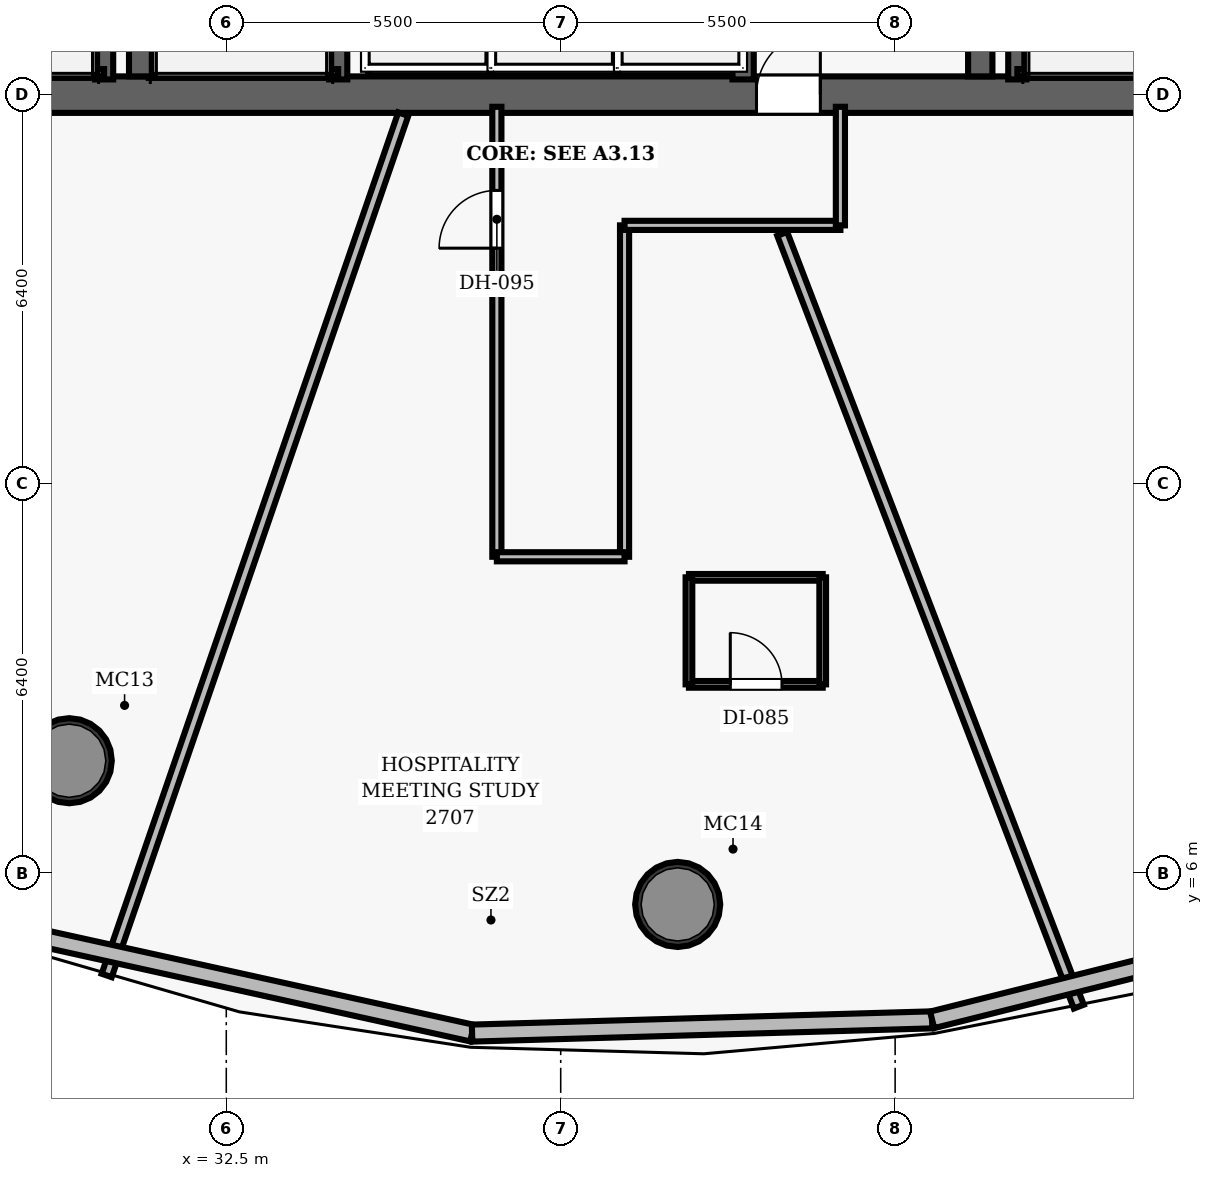
"""IFC4 building model, lengths in metres.
Left out: names, types, materials, properties, quantities, classifications, styles, units other than length and angle.
Written with IfcOpenShell. Run it as: python <this file> out.ifc"""

import sys

from ifc_helpers import new_model, si_unit, direction, frame, frame_2d, origin, origin_2d, place, context, subcontext, project, spatial, rectangle, hollow_circle, extrude, element, fill, save


model = new_model("IFC4")
c1 = context("Model", 3, precision=1e-05, world=origin(), true_north=direction((0.0, 1.0)))
c2 = subcontext(c1, "Body", "Model", "MODEL_VIEW")
j1 = project(units=[si_unit("LENGTHUNIT", "METRE"), si_unit("PLANEANGLEUNIT", "RADIAN")], contexts=[c1])
p1 = place(None, origin())
s1 = spatial("IfcSite", under=j1, at=p1, CompositionType="ELEMENT")
p2 = place(p1, origin())
s2 = spatial("IfcBuilding", under=s1, at=p2, CompositionType="ELEMENT")
p3 = place(p2, frame((0.0, 0.0, 113.3)))
s3 = spatial("IfcBuildingStorey", under=s2, at=p3, CompositionType="ELEMENT", Elevation=113.3)
p4 = place(p3, frame((26.7, 18.8, 0.0), z_axis=(0.0, 0.0, 1.0), x_axis=(1.0, 0.0, 0.0)))
e1 = element("IfcWall", 1, at=p4, inside=s3, PredefinedType="SHEAR", context=c2, shape_type="SweptSolid", body=[
    extrude(rectangle(XDim=22.6, YDim=0.6, at=frame_2d((11.3, 0.0))), origin(), (0.0, 0.0, 1.0), 3.5),
])
p5 = place(p4, frame((14.52, 0.0, 0.0)))
e2 = element("IfcOpeningElement", 2, at=p5, cuts=e1, PredefinedType="OPENING", context=c2, shape_type="SweptSolid", body=[
    extrude(rectangle(XDim=1.05, YDim=2.15, at=frame_2d((0.525, 1.075))), frame((0.0, 0.31, 0.0), z_axis=(0.0, -1.0, 0.0), x_axis=(1.0, 0.0, 0.0)), (0.0, 0.0, 1.0), 0.62),
])
for number, where, z_axis, x_axis in (
    (3, (31.1, 19.1, 0.0), (0.0, 0.0, 1.0), (0.0, 1.0, 0.0)),
    (4, (44.9, 19.1, 0.0), (0.0, 0.0, 1.0), (0.0, 1.0, 0.0)),
):
    element("IfcWall", number, at=place(p3, frame(where, z_axis=z_axis, x_axis=x_axis)), inside=s3, PredefinedType="SHEAR", context=c2, shape_type="SweptSolid", body=[
        extrude(rectangle(XDim=13.8, YDim=0.4, at=frame_2d((6.9, 0.0))), origin(), (0.0, 0.0, 1.0), 3.5),
    ])
for number, where, z_axis, x_axis in (
    (5, (29.917, 7.846, 0.0), (0.0, 0.0, 1.0), (1.0, 0.0, 0.0)),
    (6, (39.924, 5.483, 0.0), (0.0, 0.0, 1.0), (1.0, 0.0, 0.0)),
):
    element("IfcColumn", number, at=place(p3, frame(where, z_axis=z_axis, x_axis=x_axis)), inside=s3, PredefinedType="COLUMN", context=c2, shape_type="SweptSolid", body=[
        extrude(hollow_circle(Radius=0.7, WallThickness=0.055, at=origin_2d()), origin(), (0.0, 0.0, 1.0), 3.5),
    ])
p6 = place(p3, frame((30.49, 19.05, 0.0), z_axis=(0.0, 0.0, 1.0), x_axis=(0.0, 1.0, 0.0)))
e7 = element("IfcWall", 7, at=p6, inside=s3, PredefinedType="SHEAR", context=c2, shape_type="SweptSolid", body=[
    extrude(rectangle(XDim=7.5, YDim=0.3, at=frame_2d((3.75, 0.0))), origin(), (0.0, 0.0, 1.0), 3.5),
])
p7 = place(p3, frame((27.395, 19.16, 0.0), z_axis=(0.0, 0.0, 1.0), x_axis=(1.0, 0.0, 0.0)))
e8 = element("IfcWall", 8, at=p7, inside=s3, PredefinedType="SHEAR", context=c2, shape_type="SweptSolid", body=[
    extrude(rectangle(XDim=3.095, YDim=0.12, at=frame_2d((1.547, 0.0))), origin(), (0.0, 0.0, 1.0), 3.5),
])
p8 = place(p3, frame((45.51, 19.05, 0.0), z_axis=(0.0, 0.0, 1.0), x_axis=(0.0, 1.0, 0.0)))
e9 = element("IfcWall", 9, at=p8, inside=s3, PredefinedType="SHEAR", context=c2, shape_type="SweptSolid", body=[
    extrude(rectangle(XDim=7.5, YDim=0.3, at=frame_2d((3.75, 0.0))), origin(), (0.0, 0.0, 1.0), 3.5),
])
p9 = place(p3, frame((45.51, 19.16, 0.0), z_axis=(0.0, 0.0, 1.0), x_axis=(1.0, 0.0, 0.0)))
e10 = element("IfcWall", 10, at=p9, inside=s3, PredefinedType="SHEAR", context=c2, shape_type="SweptSolid", body=[
    extrude(rectangle(XDim=3.095, YDim=0.12, at=frame_2d((1.547, 0.0))), origin(), (0.0, 0.0, 1.0), 3.5),
])
p10 = place(p3, frame((34.34, 19.05, 0.0), z_axis=(0.0, 0.0, 1.0), x_axis=(0.0, 1.0, 0.0)))
e11 = element("IfcWall", 11, at=p10, inside=s3, PredefinedType="SHEAR", context=c2, shape_type="SweptSolid", body=[
    extrude(rectangle(XDim=7.5, YDim=0.3, at=frame_2d((3.75, 0.0))), origin(), (0.0, 0.0, 1.0), 3.5),
])
p11 = place(p3, frame((31.3, 19.16, 0.0), z_axis=(0.0, 0.0, 1.0), x_axis=(1.0, 0.0, 0.0)))
e12 = element("IfcWall", 12, at=p11, inside=s3, PredefinedType="SHEAR", context=c2, shape_type="SweptSolid", body=[
    extrude(rectangle(XDim=3.04, YDim=0.12, at=frame_2d((1.52, 0.0))), origin(), (0.0, 0.0, 1.0), 3.5),
])
p12 = place(p3, frame((41.0, 19.05, 0.0), z_axis=(0.0, 0.0, 1.0), x_axis=(0.0, 1.0, 0.0)))
e13 = element("IfcWall", 13, at=p12, inside=s3, PredefinedType="SHEAR", context=c2, shape_type="SweptSolid", body=[
    extrude(rectangle(XDim=2.08, YDim=0.35, at=frame_2d((1.04, 0.0))), origin(), (0.0, 0.0, 1.0), 2.675),
])
p13 = place(p3, frame((36.95, 11.2, 0.0), z_axis=(0.0, 0.0, 1.0), x_axis=(0.0, 1.0, 0.0)))
e14 = element("IfcWall", 14, at=p13, inside=s3, PredefinedType="PARTITIONING", context=c2, shape_type="SweptSolid", body=[
    extrude(rectangle(XDim=7.4, YDim=0.15, at=frame_2d((3.7, 0.0))), origin(), (0.0, 0.0, 1.0), 2.675),
])
p14 = place(p13, frame((5.075, 0.0, 0.0)))
e15 = element("IfcOpeningElement", 15, at=p14, cuts=e14, PredefinedType="OPENING", context=c2, shape_type="SweptSolid", body=[
    extrude(rectangle(XDim=0.95, YDim=2.15, at=frame_2d((0.475, 1.075))), frame((0.0, 0.085, 0.0), z_axis=(0.0, -1.0, 0.0), x_axis=(1.0, 0.0, 0.0)), (0.0, 0.0, 1.0), 0.17),
])
p15 = place(p3, frame((39.05, 11.2, 0.0), z_axis=(0.0, 0.0, 1.0), x_axis=(0.0, 1.0, 0.0)))
e16 = element("IfcWall", 16, at=p15, inside=s3, PredefinedType="PARTITIONING", context=c2, shape_type="SweptSolid", body=[
    extrude(rectangle(XDim=5.45, YDim=0.15, at=frame_2d((2.725, 0.0))), origin(), (0.0, 0.0, 1.0), 2.675),
])
p16 = place(p3, frame((39.05, 16.65, 0.0), z_axis=(0.0, 0.0, 1.0), x_axis=(1.0, 0.0, 0.0)))
e17 = element("IfcWall", 17, at=p16, inside=s3, PredefinedType="PARTITIONING", context=c2, shape_type="SweptSolid", body=[
    extrude(rectangle(XDim=3.55, YDim=0.15, at=frame_2d((1.775, 0.0))), origin(), (0.0, 0.0, 1.0), 2.675),
])
p17 = place(p3, frame((42.6, 16.65, 0.0), z_axis=(0.0, 0.0, 1.0), x_axis=(0.0, 1.0, 0.0)))
e18 = element("IfcWall", 18, at=p17, inside=s3, PredefinedType="PARTITIONING", context=c2, shape_type="SweptSolid", body=[
    extrude(rectangle(XDim=1.95, YDim=0.15, at=frame_2d((0.975, 0.0))), origin(), (0.0, 0.0, 1.0), 2.675),
])
p18 = place(p3, frame((36.95, 11.2, 0.0), z_axis=(0.0, 0.0, 1.0), x_axis=(1.0, 0.0, 0.0)))
e19 = element("IfcWall", 19, at=p18, inside=s3, PredefinedType="PARTITIONING", context=c2, shape_type="SweptSolid", body=[
    extrude(rectangle(XDim=2.1, YDim=0.15, at=frame_2d((1.05, 0.0))), origin(), (0.0, 0.0, 1.0), 2.675),
])
p19 = place(p3, frame((35.411, 18.48, 0.0), z_axis=(0.0, 0.0, 1.0), x_axis=(-0.325564767914, -0.945519741673, 0.0)))
e20 = element("IfcWall", 20, at=p19, inside=s3, PredefinedType="PARTITIONING", context=c2, shape_type="SweptSolid", body=[
    extrude(rectangle(XDim=14.981, YDim=0.175, at=frame_2d((7.491, 0.0))), origin(), (0.0, 0.0, 1.0), 2.675),
])
p20 = place(p3, frame((41.643, 16.51, 0.0), z_axis=(0.0, 0.0, 1.0), x_axis=(0.358375658047, -0.933577467444, 0.0)))
e21 = element("IfcWall", 21, at=p20, inside=s3, PredefinedType="PARTITIONING", context=c2, shape_type="SweptSolid", body=[
    extrude(rectangle(XDim=13.612, YDim=0.175, at=frame_2d((6.806, 0.0))), origin(), (0.0, 0.0, 1.0), 2.675),
])
p21 = place(p3, frame((40.109, 9.102, 0.0), z_axis=(0.0, 0.0, 1.0), x_axis=(1.0, 0.0, 0.0)))
e22 = element("IfcWall", 22, at=p21, inside=s3, PredefinedType="PARTITIONING", context=c2, shape_type="SweptSolid", body=[
    extrude(rectangle(XDim=2.2, YDim=0.11, at=frame_2d((1.1, 0.0))), origin(), (0.0, 0.0, 1.0), 2.675),
])
p22 = place(p21, frame((0.68, 0.0, 0.0)))
e23 = element("IfcOpeningElement", 23, at=p22, cuts=e22, PredefinedType="OPENING", context=c2, shape_type="SweptSolid", body=[
    extrude(rectangle(XDim=0.85, YDim=2.1, at=frame_2d((0.425, 1.05))), frame((0.0, 0.065, 0.0), z_axis=(0.0, -1.0, 0.0), x_axis=(1.0, 0.0, 0.0)), (0.0, 0.0, 1.0), 0.13),
])
p23 = place(p3, frame((40.109, 10.862, 0.0), z_axis=(0.0, 0.0, 1.0), x_axis=(1.0, 0.0, 0.0)))
e24 = element("IfcWall", 24, at=p23, inside=s3, PredefinedType="PARTITIONING", context=c2, shape_type="SweptSolid", body=[
    extrude(rectangle(XDim=2.2, YDim=0.11, at=frame_2d((1.1, 0.0))), origin(), (0.0, 0.0, 1.0), 2.675),
])
for number, where, z_axis, x_axis in (
    (25, (40.109, 9.102, 0.0), (0.0, 0.0, 1.0), (0.0, 1.0, 0.0)),
    (26, (42.309, 9.102, 0.0), (0.0, 0.0, 1.0), (0.0, 1.0, 0.0)),
):
    element("IfcWall", number, at=place(p3, frame(where, z_axis=z_axis, x_axis=x_axis)), inside=s3, PredefinedType="PARTITIONING", context=c2, shape_type="SweptSolid", body=[
        extrude(rectangle(XDim=1.76, YDim=0.11, at=frame_2d((0.88, 0.0))), origin(), (0.0, 0.0, 1.0), 2.675),
    ])
p24 = place(p3, frame((36.542, 3.367, 0.0), z_axis=(0.0, 0.0, 1.0), x_axis=(-0.976475764627, 0.215627180793, 0.0)))
e27 = element("IfcWall", 27, at=p24, inside=s3, PredefinedType="SOLIDWALL", context=c2, shape_type="SweptSolid", body=[
    extrude(rectangle(XDim=7.618, YDim=0.28, at=frame_2d((3.809, 0.0))), origin(), (0.0, 0.0, 1.0), 3.26),
])
p25 = place(p3, frame((44.108, 3.585, 0.0), z_axis=(0.0, 0.0, 1.0), x_axis=(-0.999585084737, -0.028803790922, 0.0)))
e28 = element("IfcWall", 28, at=p25, inside=s3, PredefinedType="SOLIDWALL", context=c2, shape_type="SweptSolid", body=[
    extrude(rectangle(XDim=7.569, YDim=0.28, at=frame_2d((3.785, 0.0))), origin(), (0.0, 0.0, 1.0), 3.26),
])
p26 = place(p3, frame((51.181, 5.358, 0.0), z_axis=(0.0, 0.0, 1.0), x_axis=(-0.969982762394, -0.243173684142, 0.0)))
e29 = element("IfcWall", 29, at=p26, inside=s3, PredefinedType="SOLIDWALL", context=c2, shape_type="SweptSolid", body=[
    extrude(rectangle(XDim=7.292, YDim=0.28, at=frame_2d((3.646, 0.0))), origin(), (0.0, 0.0, 1.0), 3.26),
])
p27 = place(p5, origin())
e30 = element("IfcDoor", 30, at=p27, inside=s3, OperationType="SINGLE_SWING_RIGHT", PredefinedType="DOOR", context=c2, shape_type="SweptSolid", body=[
    extrude(rectangle(XDim=1.05, YDim=2.15, at=frame_2d((0.525, 1.075))), frame((0.0, 0.025, 0.0), z_axis=(0.0, -1.0, 0.0), x_axis=(1.0, 0.0, 0.0)), (0.0, 0.0, 1.0), 0.05),
])
fill(e2, e30)
p28 = place(p14, origin())
e31 = element("IfcDoor", 31, at=p28, inside=s3, OperationType="SINGLE_SWING_LEFT", PredefinedType="DOOR", context=c2, shape_type="SweptSolid", body=[
    extrude(rectangle(XDim=0.95, YDim=2.15, at=frame_2d((0.475, 1.075))), frame((0.0, 0.025, 0.0), z_axis=(0.0, -1.0, 0.0), x_axis=(1.0, 0.0, 0.0)), (0.0, 0.0, 1.0), 0.05),
])
fill(e15, e31)
p29 = place(p22, origin())
e32 = element("IfcDoor", 32, at=p29, inside=s3, OperationType="SINGLE_SWING_LEFT", PredefinedType="DOOR", context=c2, shape_type="SweptSolid", body=[
    extrude(rectangle(XDim=0.85, YDim=2.1, at=frame_2d((0.425, 1.05))), frame((0.0, 0.025, 0.0), z_axis=(0.0, -1.0, 0.0), x_axis=(1.0, 0.0, 0.0)), (0.0, 0.0, 1.0), 0.05),
])
fill(e23, e32)
save(model, sys.argv[1])
